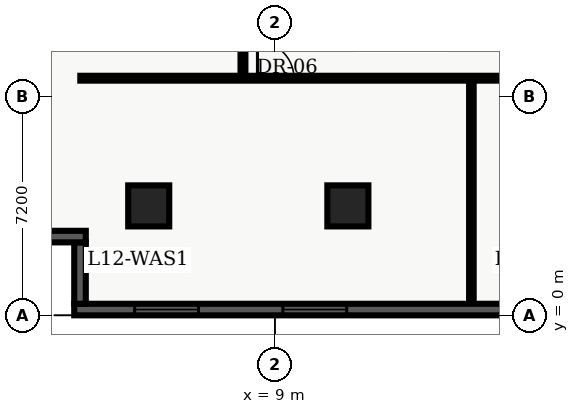
"""IFC4 building model, lengths in metres.
Left out: names, types, materials, properties, quantities, classifications, styles, units other than length and angle.
Written with IfcOpenShell. Run it as: python <this file> out.ifc"""

import sys

from ifc_helpers import new_model, entity, si_unit, converted_unit, direction, frame, origin_with_axes, origin_2d_with_axis, place, context, subcontext, project, spatial, polyline, rectangle, outline, extrude, element, fill, save


model = new_model("IFC4")
c1 = context("Model", 3, precision=1e-05, world=origin_with_axes(), true_north=direction((0.0, 1.0)))
c2 = subcontext(c1, "Body", "Model", "MODEL_VIEW")
j1 = project(units=[si_unit("LENGTHUNIT", "METRE"), converted_unit("PLANEANGLEUNIT", "DEGREE", entity("IfcPlaneAngleMeasure", 0.017), si_unit("PLANEANGLEUNIT", "RADIAN"), dimensions=[0, 0, 0, 0, 0, 0, 0])], contexts=[c1])
p1 = place(None, origin_with_axes())
s1 = spatial("IfcSite", under=j1, at=p1, CompositionType="ELEMENT")
p2 = place(p1, origin_with_axes())
s2 = spatial("IfcBuilding", under=s1, at=p2, CompositionType="ELEMENT")
p3 = place(p2, frame((0.0, 0.0, 52.2), z_axis=(0.0, 0.0, 1.0), x_axis=(1.0, 0.0, 0.0)))
s3 = spatial("IfcBuildingStorey", under=s2, at=p3, CompositionType="ELEMENT", Elevation=52.2)
for number, where, z_axis, x_axis in (
    (1, (11.4, 3.6, 0.0), (0.0, 0.0, 1.0), (1.0, 0.0, 0.0)),
    (2, (4.85, 3.6, 0.0), (0.0, 0.0, 1.0), (1.0, 0.0, 0.0)),
):
    element("IfcColumn", number, at=place(p3, frame(where, z_axis=z_axis, x_axis=x_axis)), inside=s3, PredefinedType="COLUMN", context=c2, shape_type="SweptSolid", body=[
        extrude(rectangle(XDim=1.35, YDim=1.35, at=origin_2d_with_axis()), origin_with_axes(), (0.0, 0.0, 1.0), 3.9),
    ])
p4 = place(p3, frame((2.6, 7.8, 0.0), z_axis=(0.0, 0.0, 1.0), x_axis=(1.0, 0.0, 0.0)))
e3 = element("IfcWall", 3, at=p4, inside=s3, PredefinedType="PARTITIONING", context=c2, shape_type="SweptSolid", body=[
    extrude(outline(polyline([(0.0, -0.08), (18.55, -0.08), (18.55, 0.08), (0.0, 0.08), (0.0, -0.08)])), origin_with_axes(), (0.0, 0.0, 1.0), 2.7),
])
p5 = place(p4, frame((6.426, 0.0, 0.0), z_axis=(0.0, 0.0, 1.0), x_axis=(1.0, 0.0, 0.0)))
e4 = element("IfcOpeningElement", 4, at=p5, cuts=e3, PredefinedType="OPENING", context=c2, shape_type="SweptSolid", body=[
    extrude(rectangle(XDim=1.2, YDim=0.18, at=origin_2d_with_axis()), origin_with_axes(), (0.0, 0.0, 1.0), 2.2),
])
p6 = place(p4, frame((15.681, 0.0, 0.0), z_axis=(0.0, 0.0, 1.0), x_axis=(1.0, 0.0, 0.0)))
e5 = element("IfcOpeningElement", 5, at=p6, cuts=e3, PredefinedType="OPENING", context=c2, shape_type="SweptSolid", body=[
    extrude(rectangle(XDim=1.0, YDim=0.18, at=origin_2d_with_axis()), origin_with_axes(), (0.0, 0.0, 1.0), 2.15),
])
p7 = place(p3, frame((7.95, 7.8, 0.0), z_axis=(0.0, 0.0, 1.0), x_axis=(0.0, 1.0, 0.0)))
e6 = element("IfcWall", 6, at=p7, inside=s3, PredefinedType="PARTITIONING", context=c2, shape_type="SweptSolid", body=[
    extrude(outline(polyline([(0.0, -0.08), (32.7, -0.08), (32.7, 0.08), (0.0, 0.08), (0.0, -0.08)])), origin_with_axes(), (0.0, 0.0, 1.0), 2.7),
])
p8 = place(p7, frame((2.288, 0.0, 0.0), z_axis=(0.0, 0.0, 1.0), x_axis=(1.0, 0.0, 0.0)))
e7 = element("IfcOpeningElement", 7, at=p8, cuts=e6, PredefinedType="OPENING", context=c2, shape_type="SweptSolid", body=[
    extrude(rectangle(XDim=1.0, YDim=0.18, at=origin_2d_with_axis()), origin_with_axes(), (0.0, 0.0, 1.0), 2.15),
])
p9 = place(p7, frame((6.971, 0.0, 0.0), z_axis=(0.0, 0.0, 1.0), x_axis=(1.0, 0.0, 0.0)))
e8 = element("IfcOpeningElement", 8, at=p9, cuts=e6, PredefinedType="OPENING", context=c2, shape_type="SweptSolid", body=[
    extrude(rectangle(XDim=1.0, YDim=0.18, at=origin_2d_with_axis()), origin_with_axes(), (0.0, 0.0, 1.0), 2.15),
])
p10 = place(p7, frame((12.598, 0.0, 0.0), z_axis=(0.0, 0.0, 1.0), x_axis=(1.0, 0.0, 0.0)))
e9 = element("IfcOpeningElement", 9, at=p10, cuts=e6, PredefinedType="OPENING", context=c2, shape_type="SweptSolid", body=[
    extrude(rectangle(XDim=1.0, YDim=0.18, at=origin_2d_with_axis()), origin_with_axes(), (0.0, 0.0, 1.0), 2.15),
])
p11 = place(p7, frame((19.386, 0.0, 0.0), z_axis=(0.0, 0.0, 1.0), x_axis=(1.0, 0.0, 0.0)))
e10 = element("IfcOpeningElement", 10, at=p11, cuts=e6, PredefinedType="OPENING", context=c2, shape_type="SweptSolid", body=[
    extrude(rectangle(XDim=1.0, YDim=0.18, at=origin_2d_with_axis()), origin_with_axes(), (0.0, 0.0, 1.0), 2.15),
])
p12 = place(p7, frame((27.82, 0.0, 0.0), z_axis=(0.0, 0.0, 1.0), x_axis=(1.0, 0.0, 0.0)))
e11 = element("IfcOpeningElement", 11, at=p12, cuts=e6, PredefinedType="OPENING", context=c2, shape_type="SweptSolid", body=[
    extrude(rectangle(XDim=1.0, YDim=0.18, at=origin_2d_with_axis()), origin_with_axes(), (0.0, 0.0, 1.0), 2.15),
])
p13 = place(p3, frame((15.463, 0.36, 0.0), z_axis=(0.0, 0.0, 1.0), x_axis=(0.0, 1.0, 0.0)))
e12 = element("IfcWall", 12, at=p13, inside=s3, PredefinedType="PARTITIONING", context=c2, shape_type="SweptSolid", body=[
    extrude(outline(polyline([(0.0, -0.075), (7.34, -0.075), (7.34, 0.075), (0.0, 0.075), (0.0, -0.075)])), origin_with_axes(), (0.0, 0.0, 1.0), 2.7),
])
p14 = place(p3, frame((57.22, 0.19, 0.0), z_axis=(0.0, 0.0, 1.0), x_axis=(-1.0, 0.0, 0.0)))
e13 = element("IfcWall", 13, at=p14, inside=s3, PredefinedType="SOLIDWALL", context=c2, shape_type="SweptSolid", body=[
    extrude(outline(polyline([(0.0, -0.19), (54.82, -0.19), (54.82, 0.19), (0.0, 0.19), (0.0, -0.19)])), origin_with_axes(), (0.0, 0.0, 1.0), 3.66),
])
p15 = place(p14, frame((3.037, 0.0, 0.45), z_axis=(0.0, 0.0, 1.0), x_axis=(1.0, 0.0, 0.0)))
e14 = element("IfcOpeningElement", 14, at=p15, cuts=e13, PredefinedType="OPENING", context=c2, shape_type="SweptSolid", body=[
    extrude(rectangle(XDim=2.1, YDim=0.4, at=origin_2d_with_axis()), origin_with_axes(), (0.0, 0.0, 1.0), 2.2),
])
p16 = place(p14, frame((7.912, 0.0, 0.45), z_axis=(0.0, 0.0, 1.0), x_axis=(1.0, 0.0, 0.0)))
e15 = element("IfcOpeningElement", 15, at=p16, cuts=e13, PredefinedType="OPENING", context=c2, shape_type="SweptSolid", body=[
    extrude(rectangle(XDim=2.1, YDim=0.4, at=origin_2d_with_axis()), origin_with_axes(), (0.0, 0.0, 1.0), 2.2),
])
p17 = place(p14, frame((12.786, 0.0, 0.45), z_axis=(0.0, 0.0, 1.0), x_axis=(1.0, 0.0, 0.0)))
e16 = element("IfcOpeningElement", 16, at=p17, cuts=e13, PredefinedType="OPENING", context=c2, shape_type="SweptSolid", body=[
    extrude(rectangle(XDim=2.1, YDim=0.4, at=origin_2d_with_axis()), origin_with_axes(), (0.0, 0.0, 1.0), 2.2),
])
p18 = place(p14, frame((17.661, 0.0, 0.45), z_axis=(0.0, 0.0, 1.0), x_axis=(1.0, 0.0, 0.0)))
e17 = element("IfcOpeningElement", 17, at=p18, cuts=e13, PredefinedType="OPENING", context=c2, shape_type="SweptSolid", body=[
    extrude(rectangle(XDim=2.1, YDim=0.4, at=origin_2d_with_axis()), origin_with_axes(), (0.0, 0.0, 1.0), 2.2),
])
p19 = place(p14, frame((22.535, 0.0, 0.45), z_axis=(0.0, 0.0, 1.0), x_axis=(1.0, 0.0, 0.0)))
e18 = element("IfcOpeningElement", 18, at=p19, cuts=e13, PredefinedType="OPENING", context=c2, shape_type="SweptSolid", body=[
    extrude(rectangle(XDim=2.1, YDim=0.4, at=origin_2d_with_axis()), origin_with_axes(), (0.0, 0.0, 1.0), 2.2),
])
p20 = place(p14, frame((27.41, 0.0, 0.45), z_axis=(0.0, 0.0, 1.0), x_axis=(1.0, 0.0, 0.0)))
e19 = element("IfcOpeningElement", 19, at=p20, cuts=e13, PredefinedType="OPENING", context=c2, shape_type="SweptSolid", body=[
    extrude(rectangle(XDim=2.1, YDim=0.4, at=origin_2d_with_axis()), origin_with_axes(), (0.0, 0.0, 1.0), 2.2),
])
p21 = place(p14, frame((32.285, 0.0, 0.45), z_axis=(0.0, 0.0, 1.0), x_axis=(1.0, 0.0, 0.0)))
e20 = element("IfcOpeningElement", 20, at=p21, cuts=e13, PredefinedType="OPENING", context=c2, shape_type="SweptSolid", body=[
    extrude(rectangle(XDim=2.1, YDim=0.4, at=origin_2d_with_axis()), origin_with_axes(), (0.0, 0.0, 1.0), 2.2),
])
p22 = place(p14, frame((37.159, 0.0, 0.45), z_axis=(0.0, 0.0, 1.0), x_axis=(1.0, 0.0, 0.0)))
e21 = element("IfcOpeningElement", 21, at=p22, cuts=e13, PredefinedType="OPENING", context=c2, shape_type="SweptSolid", body=[
    extrude(rectangle(XDim=2.1, YDim=0.4, at=origin_2d_with_axis()), origin_with_axes(), (0.0, 0.0, 1.0), 2.2),
])
p23 = place(p14, frame((46.908, 0.0, 0.45), z_axis=(0.0, 0.0, 1.0), x_axis=(1.0, 0.0, 0.0)))
e22 = element("IfcOpeningElement", 22, at=p23, cuts=e13, PredefinedType="OPENING", context=c2, shape_type="SweptSolid", body=[
    extrude(rectangle(XDim=2.1, YDim=0.4, at=origin_2d_with_axis()), origin_with_axes(), (0.0, 0.0, 1.0), 2.2),
])
p24 = place(p14, frame((51.783, 0.0, 0.45), z_axis=(0.0, 0.0, 1.0), x_axis=(1.0, 0.0, 0.0)))
e23 = element("IfcOpeningElement", 23, at=p24, cuts=e13, PredefinedType="OPENING", context=c2, shape_type="SweptSolid", body=[
    extrude(rectangle(XDim=2.1, YDim=0.4, at=origin_2d_with_axis()), origin_with_axes(), (0.0, 0.0, 1.0), 2.2),
])
p25 = place(p3, frame((2.59, 0.38, 0.0), z_axis=(0.0, 0.0, 1.0), x_axis=(0.0, 1.0, 0.0)))
e24 = element("IfcWall", 24, at=p25, inside=s3, PredefinedType="SOLIDWALL", context=c2, shape_type="SweptSolid", body=[
    extrude(outline(polyline([(0.0, -0.19), (2.02, -0.19), (2.02, 0.19), (0.0, 0.19), (0.0, -0.19)])), origin_with_axes(), (0.0, 0.0, 1.0), 3.66),
])
p26 = place(p3, frame((2.78, 2.59, 0.0), z_axis=(0.0, 0.0, 1.0), x_axis=(-1.0, 0.0, 0.0)))
e25 = element("IfcWall", 25, at=p26, inside=s3, PredefinedType="SOLIDWALL", context=c2, shape_type="SweptSolid", body=[
    extrude(outline(polyline([(0.0, -0.19), (2.78, -0.19), (2.78, 0.19), (0.0, 0.19), (0.0, -0.19)])), origin_with_axes(), (0.0, 0.0, 1.0), 3.66),
])
p27 = place(p4, frame((6.426, 0.0, 0.0), z_axis=(0.0, 0.0, 1.0), x_axis=(1.0, 0.0, 0.0)))
e26 = element("IfcDoor", 26, at=p27, inside=s3, OperationType="SINGLE_SWING_LEFT", PredefinedType="DOOR", context=c2, shape_type="SweptSolid", body=[
    extrude(rectangle(XDim=1.2, YDim=0.09, at=origin_2d_with_axis()), origin_with_axes(), (0.0, 0.0, 1.0), 2.2),
])
fill(e4, e26)
p28 = place(p14, frame((46.908, 0.0, 0.45), z_axis=(0.0, 0.0, 1.0), x_axis=(1.0, 0.0, 0.0)))
e27 = element("IfcWindow", 27, at=p28, inside=s3, PredefinedType="WINDOW", context=c2, shape_type="SweptSolid", body=[
    extrude(rectangle(XDim=2.1, YDim=0.09, at=origin_2d_with_axis()), origin_with_axes(), (0.0, 0.0, 1.0), 2.2),
])
fill(e22, e27)
p29 = place(p14, frame((51.783, 0.0, 0.45), z_axis=(0.0, 0.0, 1.0), x_axis=(1.0, 0.0, 0.0)))
e28 = element("IfcWindow", 28, at=p29, inside=s3, PredefinedType="WINDOW", context=c2, shape_type="SweptSolid", body=[
    extrude(rectangle(XDim=2.1, YDim=0.09, at=origin_2d_with_axis()), origin_with_axes(), (0.0, 0.0, 1.0), 2.2),
])
fill(e23, e28)
save(model, sys.argv[1])
